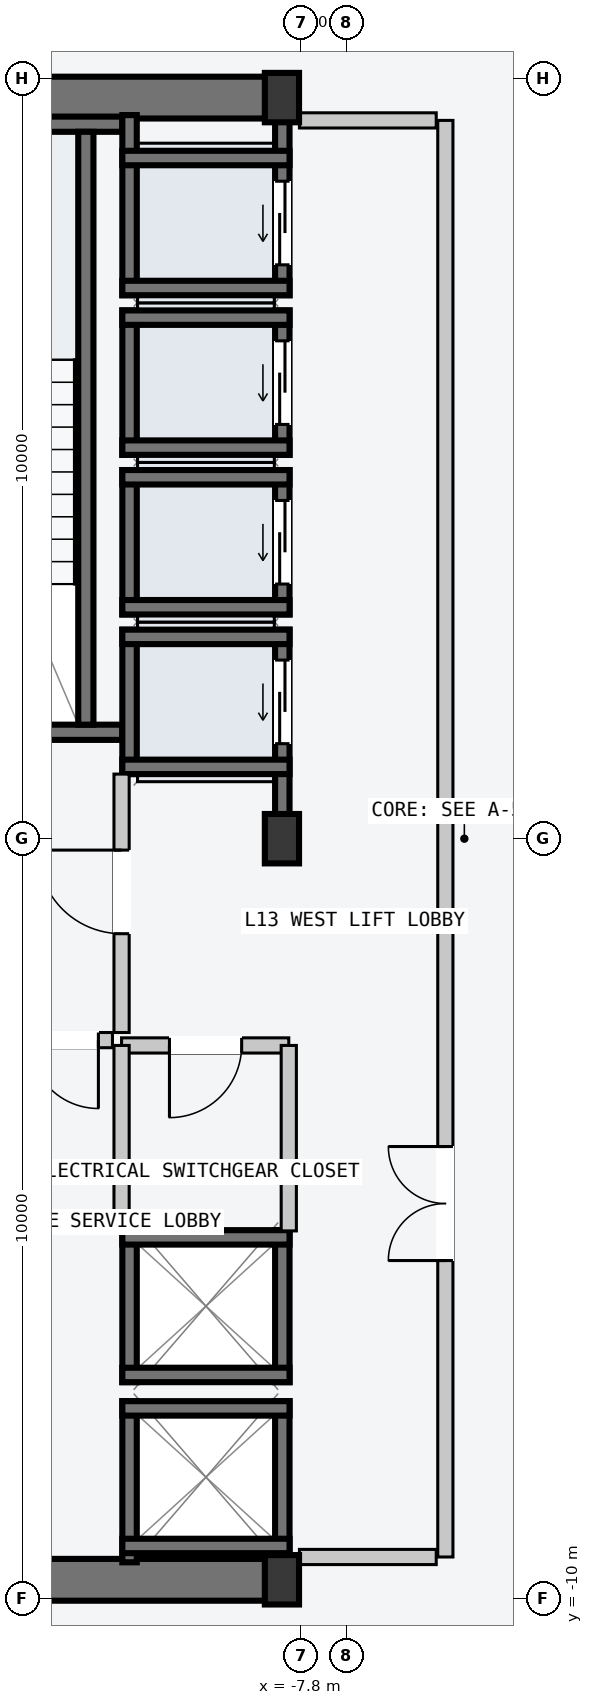
"""IFC4 building model, lengths in metres.
Left out: names, types, materials, properties, quantities, classifications, styles, units other than length and angle.
Written with IfcOpenShell. Run it as: python <this file> out.ifc"""

import sys

from ifc_helpers import new_model, si_unit, direction, frame, frame_2d, origin, origin_2d, place, context, subcontext, project, spatial, rectangle, i_section, extrude, element, fill, save


model = new_model("IFC4")
c1 = context("Model", 3, precision=1e-05, world=origin(), true_north=direction((0.0, 1.0)))
c2 = subcontext(c1, "Body", "Model", "MODEL_VIEW")
j1 = project(units=[si_unit("LENGTHUNIT", "METRE"), si_unit("PLANEANGLEUNIT", "RADIAN")], contexts=[c1])
p1 = place(None, origin())
s1 = spatial("IfcSite", under=j1, at=p1, CompositionType="ELEMENT")
p2 = place(p1, origin())
s2 = spatial("IfcBuilding", under=s1, at=p2, CompositionType="ELEMENT")
p3 = place(p2, frame((0.0, 0.0, 52.8)))
s3 = spatial("IfcBuildingStorey", under=s2, at=p3, CompositionType="ELEMENT", Elevation=52.8)
for number, where, z_axis, x_axis in (
    (1, (-14.53, -9.75, -0.2), (0.0, 0.0, 1.0), (1.0, 0.0, 0.0)),
    (2, (-14.53, 9.75, -0.2), (0.0, 0.0, 1.0), (1.0, 0.0, 0.0)),
):
    element("IfcWall", number, at=place(p3, frame(where, z_axis=z_axis, x_axis=x_axis)), inside=s3, PredefinedType="SHEAR", context=c2, shape_type="SweptSolid", body=[
        extrude(rectangle(XDim=6.46, YDim=0.55, at=frame_2d((3.23, 0.0))), origin(), (0.0, 0.0, 1.0), 3.6),
    ])
p4 = place(p3, frame((-14.25, 1.4, -0.2), z_axis=(0.0, 0.0, 1.0), x_axis=(1.0, 0.0, 0.0)))
e3 = element("IfcWall", 3, at=p4, inside=s3, PredefinedType="SOLIDWALL", context=c2, shape_type="SweptSolid", body=[
    extrude(rectangle(XDim=4.1, YDim=0.2, at=frame_2d((2.05, 0.0))), origin(), (0.0, 0.0, 1.0), 3.6),
])
p5 = place(p4, frame((1.5, 0.0, 0.2)))
e4 = element("IfcOpeningElement", 4, at=p5, cuts=e3, PredefinedType="OPENING", context=c2, shape_type="SweptSolid", body=[
    extrude(rectangle(XDim=1.12, YDim=2.18, at=frame_2d((0.56, 1.09))), frame((0.0, 0.11, 0.0), z_axis=(0.0, -1.0, 0.0), x_axis=(1.0, 0.0, 0.0)), (0.0, 0.0, 1.0), 0.22),
])
p6 = place(p3, frame((-14.25, 9.4, -0.2), z_axis=(0.0, 0.0, 1.0), x_axis=(1.0, 0.0, 0.0)))
e5 = element("IfcWall", 5, at=p6, inside=s3, PredefinedType="SOLIDWALL", context=c2, shape_type="SweptSolid", body=[
    extrude(rectangle(XDim=4.1, YDim=0.2, at=frame_2d((2.05, 0.0))), origin(), (0.0, 0.0, 1.0), 3.6),
])
p7 = place(p3, frame((-10.63, 1.5, -0.2), z_axis=(0.0, 0.0, 1.0), x_axis=(0.0, 1.0, 0.0)))
e6 = element("IfcWall", 6, at=p7, inside=s3, PredefinedType="SOLIDWALL", context=c2, shape_type="SweptSolid", body=[
    extrude(rectangle(XDim=7.8, YDim=0.2, at=frame_2d((3.9, 0.0))), origin(), (0.0, 0.0, 1.0), 3.6),
])
for number, where, z_axis, x_axis in (
    (7, (-8.05, -9.75, 0.0), (0.0, 0.0, 1.0), (1.0, 0.0, 0.0)),
    (8, (-8.05, 0.0, 0.0), (0.0, 0.0, 1.0), (1.0, 0.0, 0.0)),
    (9, (-8.05, 9.75, 0.0), (0.0, 0.0, 1.0), (1.0, 0.0, 0.0)),
):
    element("IfcColumn", number, at=place(p3, frame(where, z_axis=z_axis, x_axis=x_axis)), inside=s3, PredefinedType="COLUMN", context=c2, shape_type="SweptSolid", body=[
        extrude(i_section(OverallWidth=0.45, OverallDepth=0.65, WebThickness=0.025, FlangeThickness=0.04, at=origin_2d()), origin(), (0.0, 0.0, 1.0), 3.6),
    ])
p8 = place(p3, frame((-8.045, 0.21, -0.2), z_axis=(0.0, 0.0, 1.0), x_axis=(0.0, 1.0, 0.0)))
e10 = element("IfcWall", 10, at=p8, inside=s3, PredefinedType="SOLIDWALL", context=c2, shape_type="SweptSolid", body=[
    extrude(rectangle(XDim=2.54, YDim=0.19, at=frame_2d((1.27, 0.0))), origin(), (0.0, 0.0, 1.0), 3.6),
])
p9 = place(p8, frame((1.04, 0.0, 0.2)))
e11 = element("IfcOpeningElement", 11, at=p9, cuts=e10, PredefinedType="OPENING", context=c2, shape_type="SweptSolid", body=[
    extrude(rectangle(XDim=1.1, YDim=2.2, at=frame_2d((0.55, 1.1))), frame((0.0, 0.105, 0.0), z_axis=(0.0, -1.0, 0.0), x_axis=(1.0, 0.0, 0.0)), (0.0, 0.0, 1.0), 0.21),
])
p10 = place(p3, frame((-10.055, 0.85, -0.2), z_axis=(0.0, 0.0, 1.0), x_axis=(0.0, 1.0, 0.0)))
e12 = element("IfcWall", 12, at=p10, inside=s3, PredefinedType="SOLIDWALL", context=c2, shape_type="SweptSolid", body=[
    extrude(rectangle(XDim=1.9, YDim=0.19, at=frame_2d((0.95, 0.0))), origin(), (0.0, 0.0, 1.0), 3.6),
])
for number, where, z_axis, x_axis in (
    (13, (-10.15, 2.655, -0.2), (0.0, 0.0, 1.0), (1.0, 0.0, 0.0)),
    (14, (-10.15, 0.945, -0.2), (0.0, 0.0, 1.0), (1.0, 0.0, 0.0)),
):
    element("IfcWall", number, at=place(p3, frame(where, z_axis=z_axis, x_axis=x_axis)), inside=s3, PredefinedType="SOLIDWALL", context=c2, shape_type="SweptSolid", body=[
        extrude(rectangle(XDim=2.2, YDim=0.19, at=frame_2d((1.1, 0.0))), origin(), (0.0, 0.0, 1.0), 3.6),
    ])
p11 = place(p3, frame((-8.045, 2.95, -0.2), z_axis=(0.0, 0.0, 1.0), x_axis=(0.0, 1.0, 0.0)))
e15 = element("IfcWall", 15, at=p11, inside=s3, PredefinedType="SOLIDWALL", context=c2, shape_type="SweptSolid", body=[
    extrude(rectangle(XDim=1.9, YDim=0.19, at=frame_2d((0.95, 0.0))), origin(), (0.0, 0.0, 1.0), 3.6),
])
p12 = place(p11, frame((0.4, 0.0, 0.2)))
e16 = element("IfcOpeningElement", 16, at=p12, cuts=e15, PredefinedType="OPENING", context=c2, shape_type="SweptSolid", body=[
    extrude(rectangle(XDim=1.1, YDim=2.2, at=frame_2d((0.55, 1.1))), frame((0.0, 0.105, 0.0), z_axis=(0.0, -1.0, 0.0), x_axis=(1.0, 0.0, 0.0)), (0.0, 0.0, 1.0), 0.21),
])
p13 = place(p3, frame((-10.055, 2.95, -0.2), z_axis=(0.0, 0.0, 1.0), x_axis=(0.0, 1.0, 0.0)))
e17 = element("IfcWall", 17, at=p13, inside=s3, PredefinedType="SOLIDWALL", context=c2, shape_type="SweptSolid", body=[
    extrude(rectangle(XDim=1.9, YDim=0.19, at=frame_2d((0.95, 0.0))), origin(), (0.0, 0.0, 1.0), 3.6),
])
for number, where, z_axis, x_axis in (
    (18, (-10.15, 4.755, -0.2), (0.0, 0.0, 1.0), (1.0, 0.0, 0.0)),
    (19, (-10.15, 3.045, -0.2), (0.0, 0.0, 1.0), (1.0, 0.0, 0.0)),
):
    element("IfcWall", number, at=place(p3, frame(where, z_axis=z_axis, x_axis=x_axis)), inside=s3, PredefinedType="SOLIDWALL", context=c2, shape_type="SweptSolid", body=[
        extrude(rectangle(XDim=2.2, YDim=0.19, at=frame_2d((1.1, 0.0))), origin(), (0.0, 0.0, 1.0), 3.6),
    ])
p14 = place(p3, frame((-8.045, 5.05, -0.2), z_axis=(0.0, 0.0, 1.0), x_axis=(0.0, 1.0, 0.0)))
e20 = element("IfcWall", 20, at=p14, inside=s3, PredefinedType="SOLIDWALL", context=c2, shape_type="SweptSolid", body=[
    extrude(rectangle(XDim=1.9, YDim=0.19, at=frame_2d((0.95, 0.0))), origin(), (0.0, 0.0, 1.0), 3.6),
])
p15 = place(p14, frame((0.4, 0.0, 0.2)))
e21 = element("IfcOpeningElement", 21, at=p15, cuts=e20, PredefinedType="OPENING", context=c2, shape_type="SweptSolid", body=[
    extrude(rectangle(XDim=1.1, YDim=2.2, at=frame_2d((0.55, 1.1))), frame((0.0, 0.105, 0.0), z_axis=(0.0, -1.0, 0.0), x_axis=(1.0, 0.0, 0.0)), (0.0, 0.0, 1.0), 0.21),
])
p16 = place(p3, frame((-10.055, 5.05, -0.2), z_axis=(0.0, 0.0, 1.0), x_axis=(0.0, 1.0, 0.0)))
e22 = element("IfcWall", 22, at=p16, inside=s3, PredefinedType="SOLIDWALL", context=c2, shape_type="SweptSolid", body=[
    extrude(rectangle(XDim=1.9, YDim=0.19, at=frame_2d((0.95, 0.0))), origin(), (0.0, 0.0, 1.0), 3.6),
])
for number, where, z_axis, x_axis in (
    (23, (-10.15, 6.855, -0.2), (0.0, 0.0, 1.0), (1.0, 0.0, 0.0)),
    (24, (-10.15, 5.145, -0.2), (0.0, 0.0, 1.0), (1.0, 0.0, 0.0)),
):
    element("IfcWall", number, at=place(p3, frame(where, z_axis=z_axis, x_axis=x_axis)), inside=s3, PredefinedType="SOLIDWALL", context=c2, shape_type="SweptSolid", body=[
        extrude(rectangle(XDim=2.2, YDim=0.19, at=frame_2d((1.1, 0.0))), origin(), (0.0, 0.0, 1.0), 3.6),
    ])
p17 = place(p3, frame((-8.045, 7.15, -0.2), z_axis=(0.0, 0.0, 1.0), x_axis=(0.0, 1.0, 0.0)))
e25 = element("IfcWall", 25, at=p17, inside=s3, PredefinedType="SOLIDWALL", context=c2, shape_type="SweptSolid", body=[
    extrude(rectangle(XDim=2.37, YDim=0.19, at=frame_2d((1.185, 0.0))), origin(), (0.0, 0.0, 1.0), 3.6),
])
p18 = place(p17, frame((0.4, 0.0, 0.2)))
e26 = element("IfcOpeningElement", 26, at=p18, cuts=e25, PredefinedType="OPENING", context=c2, shape_type="SweptSolid", body=[
    extrude(rectangle(XDim=1.1, YDim=2.2, at=frame_2d((0.55, 1.1))), frame((0.0, 0.105, 0.0), z_axis=(0.0, -1.0, 0.0), x_axis=(1.0, 0.0, 0.0)), (0.0, 0.0, 1.0), 0.21),
])
p19 = place(p3, frame((-10.055, 7.15, -0.2), z_axis=(0.0, 0.0, 1.0), x_axis=(0.0, 1.0, 0.0)))
e27 = element("IfcWall", 27, at=p19, inside=s3, PredefinedType="SOLIDWALL", context=c2, shape_type="SweptSolid", body=[
    extrude(rectangle(XDim=2.37, YDim=0.19, at=frame_2d((1.185, 0.0))), origin(), (0.0, 0.0, 1.0), 3.6),
])
for number, where, z_axis, x_axis in (
    (28, (-10.15, 8.955, -0.2), (0.0, 0.0, 1.0), (1.0, 0.0, 0.0)),
    (29, (-10.15, 7.245, -0.2), (0.0, 0.0, 1.0), (1.0, 0.0, 0.0)),
):
    element("IfcWall", number, at=place(p3, frame(where, z_axis=z_axis, x_axis=x_axis)), inside=s3, PredefinedType="SOLIDWALL", context=c2, shape_type="SweptSolid", body=[
        extrude(rectangle(XDim=2.2, YDim=0.19, at=frame_2d((1.1, 0.0))), origin(), (0.0, 0.0, 1.0), 3.6),
    ])
for number, where, z_axis, x_axis in (
    (30, (-8.045, -9.52, -0.2), (0.0, 0.0, 1.0), (0.0, 1.0, 0.0)),
    (31, (-10.055, -9.52, -0.2), (0.0, 0.0, 1.0), (0.0, 1.0, 0.0)),
):
    element("IfcWall", number, at=place(p3, frame(where, z_axis=z_axis, x_axis=x_axis)), inside=s3, PredefinedType="SOLIDWALL", context=c2, shape_type="SweptSolid", body=[
        extrude(rectangle(XDim=2.12, YDim=0.19, at=frame_2d((1.06, 0.0))), origin(), (0.0, 0.0, 1.0), 3.6),
    ])
for number, where, z_axis, x_axis in (
    (32, (-10.15, -7.495, -0.2), (0.0, 0.0, 1.0), (1.0, 0.0, 0.0)),
    (33, (-10.15, -9.305, -0.2), (0.0, 0.0, 1.0), (1.0, 0.0, 0.0)),
):
    element("IfcWall", number, at=place(p3, frame(where, z_axis=z_axis, x_axis=x_axis)), inside=s3, PredefinedType="SOLIDWALL", context=c2, shape_type="SweptSolid", body=[
        extrude(rectangle(XDim=2.2, YDim=0.19, at=frame_2d((1.1, 0.0))), origin(), (0.0, 0.0, 1.0), 3.6),
    ])
for number, where, z_axis, x_axis in (
    (34, (-8.045, -7.15, -0.2), (0.0, 0.0, 1.0), (0.0, 1.0, 0.0)),
    (35, (-10.055, -7.15, -0.2), (0.0, 0.0, 1.0), (0.0, 1.0, 0.0)),
):
    element("IfcWall", number, at=place(p3, frame(where, z_axis=z_axis, x_axis=x_axis)), inside=s3, PredefinedType="SOLIDWALL", context=c2, shape_type="SweptSolid", body=[
        extrude(rectangle(XDim=2.0, YDim=0.19, at=frame_2d((1.0, 0.0))), origin(), (0.0, 0.0, 1.0), 3.6),
    ])
for number, where, z_axis, x_axis in (
    (36, (-10.15, -5.245, -0.2), (0.0, 0.0, 1.0), (1.0, 0.0, 0.0)),
    (37, (-10.15, -7.055, -0.2), (0.0, 0.0, 1.0), (1.0, 0.0, 0.0)),
):
    element("IfcWall", number, at=place(p3, frame(where, z_axis=z_axis, x_axis=x_axis)), inside=s3, PredefinedType="SOLIDWALL", context=c2, shape_type="SweptSolid", body=[
        extrude(rectangle(XDim=2.2, YDim=0.19, at=frame_2d((1.1, 0.0))), origin(), (0.0, 0.0, 1.0), 3.6),
    ])
p20 = place(p3, frame((-5.9, -9.45, 0.0), z_axis=(0.0, 0.0, 1.0), x_axis=(0.0, 1.0, 0.0)))
e38 = element("IfcWall", 38, at=p20, inside=s3, PredefinedType="PARTITIONING", context=c2, shape_type="SweptSolid", body=[
    extrude(rectangle(XDim=18.9, YDim=0.2, at=frame_2d((9.45, 0.0))), origin(), (0.0, 0.0, 1.0), 3.4),
])
p21 = place(p20, frame((3.9, 0.0, 0.0)))
e39 = element("IfcOpeningElement", 39, at=p21, cuts=e38, PredefinedType="OPENING", context=c2, shape_type="SweptSolid", body=[
    extrude(rectangle(XDim=1.5, YDim=2.2, at=frame_2d((0.75, 1.1))), frame((0.0, 0.11, 0.0), z_axis=(0.0, -1.0, 0.0), x_axis=(1.0, 0.0, 0.0)), (0.0, 0.0, 1.0), 0.22),
])
for number, where, z_axis, x_axis in (
    (40, (-6.02, -9.45, 0.0), (0.0, 0.0, 1.0), (-1.0, 0.0, 0.0)),
    (41, (-6.02, 9.45, 0.0), (0.0, 0.0, 1.0), (-1.0, 0.0, 0.0)),
):
    element("IfcWall", number, at=place(p3, frame(where, z_axis=z_axis, x_axis=x_axis)), inside=s3, PredefinedType="PARTITIONING", context=c2, shape_type="SweptSolid", body=[
        extrude(rectangle(XDim=1.8, YDim=0.2, at=frame_2d((0.9, 0.0))), origin(), (0.0, 0.0, 1.0), 3.4),
    ])
p22 = place(p3, frame((-10.16, -2.55, 0.0), z_axis=(0.0, 0.0, 1.0), x_axis=(0.0, 1.0, 0.0)))
e42 = element("IfcWall", 42, at=p22, inside=s3, PredefinedType="PARTITIONING", context=c2, shape_type="SweptSolid", body=[
    extrude(rectangle(XDim=3.4, YDim=0.2, at=frame_2d((1.7, 0.0))), origin(), (0.0, 0.0, 1.0), 3.4),
])
p23 = place(p22, frame((1.3, 0.0, 0.0)))
e43 = element("IfcOpeningElement", 43, at=p23, cuts=e42, PredefinedType="OPENING", context=c2, shape_type="SweptSolid", body=[
    extrude(rectangle(XDim=1.1, YDim=2.15, at=frame_2d((0.55, 1.075))), frame((0.0, 0.11, 0.0), z_axis=(0.0, -1.0, 0.0), x_axis=(1.0, 0.0, 0.0)), (0.0, 0.0, 1.0), 0.22),
])
p24 = place(p3, frame((-10.28, -2.65, 0.0), z_axis=(0.0, 0.0, 1.0), x_axis=(-1.0, 0.0, 0.0)))
e44 = element("IfcWall", 44, at=p24, inside=s3, PredefinedType="PARTITIONING", context=c2, shape_type="SweptSolid", body=[
    extrude(rectangle(XDim=1.27, YDim=0.2, at=frame_2d((0.635, 0.0))), origin(), (0.0, 0.0, 1.0), 3.4),
])
p25 = place(p24, frame((0.185, 0.0, 0.0)))
e45 = element("IfcOpeningElement", 45, at=p25, cuts=e44, PredefinedType="OPENING", context=c2, shape_type="SweptSolid", body=[
    extrude(rectangle(XDim=0.9, YDim=2.15, at=frame_2d((0.45, 1.075))), frame((0.0, 0.11, 0.0), z_axis=(0.0, -1.0, 0.0), x_axis=(1.0, 0.0, 0.0)), (0.0, 0.0, 1.0), 0.22),
])
p26 = place(p3, frame((-7.96, -2.72, 0.0), z_axis=(0.0, 0.0, 1.0), x_axis=(-1.0, 0.0, 0.0)))
e46 = element("IfcWall", 46, at=p26, inside=s3, PredefinedType="PARTITIONING", context=c2, shape_type="SweptSolid", body=[
    extrude(rectangle(XDim=2.2, YDim=0.2, at=frame_2d((1.1, 0.0))), origin(), (0.0, 0.0, 1.0), 3.4),
])
p27 = place(p26, frame((0.62, 0.0, 0.0)))
e47 = element("IfcOpeningElement", 47, at=p27, cuts=e46, PredefinedType="OPENING", context=c2, shape_type="SweptSolid", body=[
    extrude(rectangle(XDim=0.95, YDim=2.1, at=frame_2d((0.475, 1.05))), frame((0.0, 0.11, 0.0), z_axis=(0.0, -1.0, 0.0), x_axis=(1.0, 0.0, 0.0)), (0.0, 0.0, 1.0), 0.22),
])
for number, where, z_axis, x_axis in (
    (48, (-7.96, -5.16, 0.0), (0.0, 0.0, 1.0), (0.0, 1.0, 0.0)),
    (49, (-10.16, -5.16, 0.0), (0.0, 0.0, 1.0), (0.0, 1.0, 0.0)),
):
    element("IfcWall", number, at=place(p3, frame(where, z_axis=z_axis, x_axis=x_axis)), inside=s3, PredefinedType="PARTITIONING", context=c2, shape_type="SweptSolid", body=[
        extrude(rectangle(XDim=2.44, YDim=0.2, at=frame_2d((1.22, 0.0))), origin(), (0.0, 0.0, 1.0), 3.4),
    ])
p28 = place(p9, origin())
e50 = element("IfcDoor", 50, at=p28, inside=s3, OperationType="SLIDING_TO_LEFT", PredefinedType="DOOR", context=c2, shape_type="SweptSolid", body=[
    extrude(rectangle(XDim=1.1, YDim=2.2, at=frame_2d((0.55, 1.1))), frame((0.0, 0.025, 0.0), z_axis=(0.0, -1.0, 0.0), x_axis=(1.0, 0.0, 0.0)), (0.0, 0.0, 1.0), 0.05),
])
fill(e11, e50)
p29 = place(p12, origin())
e51 = element("IfcDoor", 51, at=p29, inside=s3, OperationType="SLIDING_TO_LEFT", PredefinedType="DOOR", context=c2, shape_type="SweptSolid", body=[
    extrude(rectangle(XDim=1.1, YDim=2.2, at=frame_2d((0.55, 1.1))), frame((0.0, 0.025, 0.0), z_axis=(0.0, -1.0, 0.0), x_axis=(1.0, 0.0, 0.0)), (0.0, 0.0, 1.0), 0.05),
])
fill(e16, e51)
p30 = place(p15, origin())
e52 = element("IfcDoor", 52, at=p30, inside=s3, OperationType="SLIDING_TO_LEFT", PredefinedType="DOOR", context=c2, shape_type="SweptSolid", body=[
    extrude(rectangle(XDim=1.1, YDim=2.2, at=frame_2d((0.55, 1.1))), frame((0.0, 0.025, 0.0), z_axis=(0.0, -1.0, 0.0), x_axis=(1.0, 0.0, 0.0)), (0.0, 0.0, 1.0), 0.05),
])
fill(e21, e52)
p31 = place(p18, origin())
e53 = element("IfcDoor", 53, at=p31, inside=s3, OperationType="SLIDING_TO_LEFT", PredefinedType="DOOR", context=c2, shape_type="SweptSolid", body=[
    extrude(rectangle(XDim=1.1, YDim=2.2, at=frame_2d((0.55, 1.1))), frame((0.0, 0.025, 0.0), z_axis=(0.0, -1.0, 0.0), x_axis=(1.0, 0.0, 0.0)), (0.0, 0.0, 1.0), 0.05),
])
fill(e26, e53)
p32 = place(p21, origin())
e54 = element("IfcDoor", 54, at=p32, inside=s3, OperationType="DOUBLE_DOOR_SINGLE_SWING", PredefinedType="DOOR", context=c2, shape_type="SweptSolid", body=[
    extrude(rectangle(XDim=1.5, YDim=2.2, at=frame_2d((0.75, 1.1))), frame((0.0, 0.025, 0.0), z_axis=(0.0, -1.0, 0.0), x_axis=(1.0, 0.0, 0.0)), (0.0, 0.0, 1.0), 0.05),
])
fill(e39, e54)
p33 = place(p23, origin())
e55 = element("IfcDoor", 55, at=p33, inside=s3, OperationType="SINGLE_SWING_RIGHT", PredefinedType="DOOR", context=c2, shape_type="SweptSolid", body=[
    extrude(rectangle(XDim=1.1, YDim=2.15, at=frame_2d((0.55, 1.075))), frame((0.0, 0.025, 0.0), z_axis=(0.0, -1.0, 0.0), x_axis=(1.0, 0.0, 0.0)), (0.0, 0.0, 1.0), 0.05),
])
fill(e43, e55)
p34 = place(p25, origin())
e56 = element("IfcDoor", 56, at=p34, inside=s3, OperationType="SINGLE_SWING_LEFT", PredefinedType="DOOR", context=c2, shape_type="SweptSolid", body=[
    extrude(rectangle(XDim=0.9, YDim=2.15, at=frame_2d((0.45, 1.075))), frame((0.0, 0.025, 0.0), z_axis=(0.0, -1.0, 0.0), x_axis=(1.0, 0.0, 0.0)), (0.0, 0.0, 1.0), 0.05),
])
fill(e45, e56)
p35 = place(p27, origin())
e57 = element("IfcDoor", 57, at=p35, inside=s3, OperationType="SINGLE_SWING_RIGHT", PredefinedType="DOOR", context=c2, shape_type="SweptSolid", body=[
    extrude(rectangle(XDim=0.95, YDim=2.1, at=frame_2d((0.475, 1.05))), frame((0.0, 0.025, 0.0), z_axis=(0.0, -1.0, 0.0), x_axis=(1.0, 0.0, 0.0)), (0.0, 0.0, 1.0), 0.05),
])
fill(e47, e57)
save(model, sys.argv[1])
